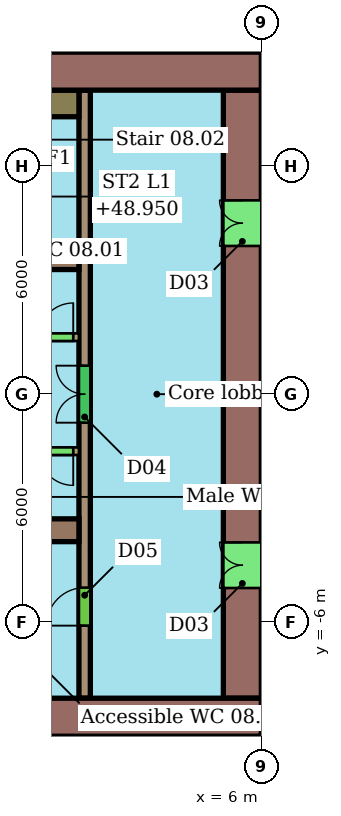
"""IFC4 building model, lengths in metres.
Left out: names, types, materials, properties, quantities, classifications, styles, units other than length and angle.
Written with IfcOpenShell. Run it as: python <this file> out.ifc"""

import sys

from ifc_helpers import new_model, si_unit, direction, frame, frame_2d, origin, place, context, subcontext, project, spatial, rectangle, extrude, element, fill, save


model = new_model("IFC4")
c1 = context("Model", 3, precision=1e-05, world=origin(), true_north=direction((0.0, 1.0)))
c2 = subcontext(c1, "Body", "Model", "MODEL_VIEW")
j1 = project(units=[si_unit("LENGTHUNIT", "METRE"), si_unit("PLANEANGLEUNIT", "RADIAN")], contexts=[c1])
p1 = place(None, origin())
s1 = spatial("IfcSite", under=j1, at=p1, CompositionType="ELEMENT")
p2 = place(p1, origin())
s2 = spatial("IfcBuilding", under=s1, at=p2, CompositionType="ELEMENT")
p3 = place(p2, frame((0.0, 0.0, 47.1)))
s3 = spatial("IfcBuildingStorey", under=s2, at=p3, CompositionType="ELEMENT", Elevation=47.1)
p4 = place(p3, frame((6.0, 8.5, 0.0), z_axis=(0.0, 0.0, 1.0), x_axis=(-1.0, 0.0, 0.0)))
e1 = element("IfcWall", 1, at=p4, inside=s3, PredefinedType="SHEAR", context=c2, shape_type="SweptSolid", body=[
    extrude(rectangle(XDim=12.0, YDim=1.0, at=frame_2d((6.0, 0.0))), origin(), (0.0, 0.0, 1.0), 3.4),
])
p5 = place(p4, frame((5.6, 0.0, 0.0)))
e2 = element("IfcOpeningElement", 2, at=p5, cuts=e1, PredefinedType="OPENING", context=c2, shape_type="SweptSolid", body=[
    extrude(rectangle(XDim=1.2, YDim=2.1, at=frame_2d((0.6, 1.05))), frame((0.0, 0.51, 0.0), z_axis=(0.0, -1.0, 0.0), x_axis=(1.0, 0.0, 0.0)), (0.0, 0.0, 1.0), 1.02),
])
p6 = place(p3, frame((-18.0, -8.5, 0.0), z_axis=(0.0, 0.0, 1.0), x_axis=(1.0, 0.0, 0.0)))
e3 = element("IfcWall", 3, at=p6, inside=s3, PredefinedType="SHEAR", context=c2, shape_type="SweptSolid", body=[
    extrude(rectangle(XDim=24.0, YDim=1.0, at=frame_2d((12.0, 0.0))), origin(), (0.0, 0.0, 1.0), 3.4),
])
p7 = place(p6, frame((6.0, 0.0, 0.0)))
e4 = element("IfcOpeningElement", 4, at=p7, cuts=e3, PredefinedType="OPENING", context=c2, shape_type="SweptSolid", body=[
    extrude(rectangle(XDim=1.2, YDim=2.1, at=frame_2d((0.6, 1.05))), frame((0.0, 0.51, 0.0), z_axis=(0.0, -1.0, 0.0), x_axis=(1.0, 0.0, 0.0)), (0.0, 0.0, 1.0), 1.02),
])
p8 = place(p3, frame((5.5, -8.0, 0.0), z_axis=(0.0, 0.0, 1.0), x_axis=(0.0, 1.0, 0.0)))
e5 = element("IfcWall", 5, at=p8, inside=s3, PredefinedType="SHEAR", context=c2, shape_type="SweptSolid", body=[
    extrude(rectangle(XDim=16.0, YDim=1.0, at=frame_2d((8.0, 0.0))), origin(), (0.0, 0.0, 1.0), 3.4),
])
p9 = place(p8, frame((2.9, 0.0, 0.0)))
e6 = element("IfcOpeningElement", 6, at=p9, cuts=e5, PredefinedType="OPENING", context=c2, shape_type="SweptSolid", body=[
    extrude(rectangle(XDim=1.2, YDim=2.1, at=frame_2d((0.6, 1.05))), frame((0.0, 0.51, 0.0), z_axis=(0.0, -1.0, 0.0), x_axis=(1.0, 0.0, 0.0)), (0.0, 0.0, 1.0), 1.02),
])
p10 = place(p8, frame((11.9, 0.0, 0.0)))
e7 = element("IfcOpeningElement", 7, at=p10, cuts=e5, PredefinedType="OPENING", context=c2, shape_type="SweptSolid", body=[
    extrude(rectangle(XDim=1.2, YDim=2.1, at=frame_2d((0.6, 1.05))), frame((0.0, 0.51, 0.0), z_axis=(0.0, -1.0, 0.0), x_axis=(1.0, 0.0, 0.0)), (0.0, 0.0, 1.0), 1.02),
])
for number, where, z_axis, x_axis in (
    (8, (-6.0, 3.58, 0.0), (0.0, 0.0, 1.0), (1.0, 0.0, 0.0)),
    (9, (-6.0, -3.58, 0.0), (0.0, 0.0, 1.0), (1.0, 0.0, 0.0)),
):
    element("IfcWall", number, at=place(p3, frame(where, z_axis=z_axis, x_axis=x_axis)), inside=s3, PredefinedType="SHEAR", context=c2, shape_type="SweptSolid", body=[
        extrude(rectangle(XDim=7.2, YDim=0.6, at=frame_2d((3.6, 0.0))), origin(), (0.0, 0.0, 1.0), 3.4),
    ])
p11 = place(p3, frame((1.35, -8.0, 0.0), z_axis=(0.0, 0.0, 1.0), x_axis=(0.0, 1.0, 0.0)))
e10 = element("IfcWall", 10, at=p11, inside=s3, PredefinedType="SHEAR", context=c2, shape_type="SweptSolid", body=[
    extrude(rectangle(XDim=16.0, YDim=0.3, at=frame_2d((8.0, 0.0))), origin(), (0.0, 0.0, 1.0), 3.4),
])
p12 = place(p11, frame((1.91, 0.0, 0.0)))
e11 = element("IfcOpeningElement", 11, at=p12, cuts=e10, PredefinedType="OPENING", context=c2, shape_type="SweptSolid", body=[
    extrude(rectangle(XDim=1.0, YDim=2.1, at=frame_2d((0.5, 1.05))), frame((0.0, 0.16, 0.0), z_axis=(0.0, -1.0, 0.0), x_axis=(1.0, 0.0, 0.0)), (0.0, 0.0, 1.0), 0.32),
])
p13 = place(p11, frame((7.25, 0.0, 0.0)))
e12 = element("IfcOpeningElement", 12, at=p13, cuts=e10, PredefinedType="OPENING", context=c2, shape_type="SweptSolid", body=[
    extrude(rectangle(XDim=1.5, YDim=2.1, at=frame_2d((0.75, 1.05))), frame((0.0, 0.16, 0.0), z_axis=(0.0, -1.0, 0.0), x_axis=(1.0, 0.0, 0.0)), (0.0, 0.0, 1.0), 0.32),
])
p14 = place(p3, frame((-13.2, 1.5, 0.0), z_axis=(0.0, 0.0, 1.0), x_axis=(1.0, 0.0, 0.0)))
e13 = element("IfcWall", 13, at=p14, inside=s3, PredefinedType="SHEAR", context=c2, shape_type="SweptSolid", body=[
    extrude(rectangle(XDim=14.4, YDim=0.2, at=frame_2d((7.2, 0.0))), origin(), (0.0, 0.0, 1.0), 3.4),
])
p15 = place(p14, frame((0.546, 0.0, 0.0)))
e14 = element("IfcOpeningElement", 14, at=p15, cuts=e13, PredefinedType="OPENING", context=c2, shape_type="SweptSolid", body=[
    extrude(rectangle(XDim=1.1, YDim=2.1, at=frame_2d((0.55, 1.05))), frame((0.0, 0.11, 0.0), z_axis=(0.0, -1.0, 0.0), x_axis=(1.0, 0.0, 0.0)), (0.0, 0.0, 1.0), 0.22),
])
p16 = place(p14, frame((2.988, 0.0, 0.0)))
e15 = element("IfcOpeningElement", 15, at=p16, cuts=e13, PredefinedType="OPENING", context=c2, shape_type="SweptSolid", body=[
    extrude(rectangle(XDim=1.1, YDim=2.1, at=frame_2d((0.55, 1.05))), frame((0.0, 0.11, 0.0), z_axis=(0.0, -1.0, 0.0), x_axis=(1.0, 0.0, 0.0)), (0.0, 0.0, 1.0), 0.22),
])
p17 = place(p14, frame((5.429, 0.0, 0.0)))
e16 = element("IfcOpeningElement", 16, at=p17, cuts=e13, PredefinedType="OPENING", context=c2, shape_type="SweptSolid", body=[
    extrude(rectangle(XDim=1.1, YDim=2.1, at=frame_2d((0.55, 1.05))), frame((0.0, 0.11, 0.0), z_axis=(0.0, -1.0, 0.0), x_axis=(1.0, 0.0, 0.0)), (0.0, 0.0, 1.0), 0.22),
])
p18 = place(p14, frame((7.871, 0.0, 0.0)))
e17 = element("IfcOpeningElement", 17, at=p18, cuts=e13, PredefinedType="OPENING", context=c2, shape_type="SweptSolid", body=[
    extrude(rectangle(XDim=1.1, YDim=2.1, at=frame_2d((0.55, 1.05))), frame((0.0, 0.11, 0.0), z_axis=(0.0, -1.0, 0.0), x_axis=(1.0, 0.0, 0.0)), (0.0, 0.0, 1.0), 0.22),
])
p19 = place(p14, frame((13.35, 0.0, 0.0)))
e18 = element("IfcOpeningElement", 18, at=p19, cuts=e13, PredefinedType="OPENING", context=c2, shape_type="SweptSolid", body=[
    extrude(rectangle(XDim=0.9, YDim=2.1, at=frame_2d((0.45, 1.05))), frame((0.0, 0.11, 0.0), z_axis=(0.0, -1.0, 0.0), x_axis=(1.0, 0.0, 0.0)), (0.0, 0.0, 1.0), 0.22),
])
p20 = place(p3, frame((1.2, -1.5, 0.0), z_axis=(0.0, 0.0, 1.0), x_axis=(-1.0, 0.0, 0.0)))
e19 = element("IfcWall", 19, at=p20, inside=s3, PredefinedType="SHEAR", context=c2, shape_type="SweptSolid", body=[
    extrude(rectangle(XDim=14.4, YDim=0.2, at=frame_2d((7.2, 0.0))), origin(), (0.0, 0.0, 1.0), 3.4),
])
p21 = place(p20, frame((7.821, 0.0, 0.0)))
e20 = element("IfcOpeningElement", 20, at=p21, cuts=e19, PredefinedType="OPENING", context=c2, shape_type="SweptSolid", body=[
    extrude(rectangle(XDim=1.2, YDim=2.1, at=frame_2d((0.6, 1.05))), frame((0.0, 0.11, 0.0), z_axis=(0.0, -1.0, 0.0), x_axis=(1.0, 0.0, 0.0)), (0.0, 0.0, 1.0), 0.22),
])
p22 = place(p20, frame((0.15, 0.0, 0.0)))
e21 = element("IfcOpeningElement", 21, at=p22, cuts=e19, PredefinedType="OPENING", context=c2, shape_type="SweptSolid", body=[
    extrude(rectangle(XDim=0.9, YDim=2.1, at=frame_2d((0.45, 1.05))), frame((0.0, 0.11, 0.0), z_axis=(0.0, -1.0, 0.0), x_axis=(1.0, 0.0, 0.0)), (0.0, 0.0, 1.0), 0.22),
])
p23 = place(p3, frame((0.4, 7.65, 0.0), z_axis=(0.0, 0.0, 1.0), x_axis=(1.0, 0.0, 0.0)))
e22 = element("IfcWall", 22, at=p23, inside=s3, PredefinedType="SHEAR", context=c2, shape_type="SweptSolid", body=[
    extrude(rectangle(XDim=0.8, YDim=0.7, at=frame_2d((0.4, 0.0))), origin(), (0.0, 0.0, 1.0), 3.4),
])
p24 = place(p9, origin())
e23 = element("IfcDoor", 23, at=p24, inside=s3, OperationType="DOUBLE_DOOR_SINGLE_SWING", PredefinedType="NOTDEFINED", context=c2, shape_type="SweptSolid", body=[
    extrude(rectangle(XDim=1.2, YDim=2.1, at=frame_2d((0.6, 1.05))), frame((0.0, 0.025, 0.0), z_axis=(0.0, -1.0, 0.0), x_axis=(1.0, 0.0, 0.0)), (0.0, 0.0, 1.0), 0.05),
])
fill(e6, e23)
p25 = place(p10, origin())
e24 = element("IfcDoor", 24, at=p25, inside=s3, OperationType="DOUBLE_DOOR_SINGLE_SWING", PredefinedType="NOTDEFINED", context=c2, shape_type="SweptSolid", body=[
    extrude(rectangle(XDim=1.2, YDim=2.1, at=frame_2d((0.6, 1.05))), frame((0.0, 0.025, 0.0), z_axis=(0.0, -1.0, 0.0), x_axis=(1.0, 0.0, 0.0)), (0.0, 0.0, 1.0), 0.05),
])
fill(e7, e24)
p26 = place(p12, origin())
e25 = element("IfcDoor", 25, at=p26, inside=s3, OperationType="SINGLE_SWING_LEFT", PredefinedType="NOTDEFINED", context=c2, shape_type="SweptSolid", body=[
    extrude(rectangle(XDim=1.0, YDim=2.1, at=frame_2d((0.5, 1.05))), frame((0.0, 0.025, 0.0), z_axis=(0.0, -1.0, 0.0), x_axis=(1.0, 0.0, 0.0)), (0.0, 0.0, 1.0), 0.05),
])
fill(e11, e25)
p27 = place(p13, origin())
e26 = element("IfcDoor", 26, at=p27, inside=s3, OperationType="DOUBLE_DOOR_SINGLE_SWING", PredefinedType="NOTDEFINED", context=c2, shape_type="SweptSolid", body=[
    extrude(rectangle(XDim=1.5, YDim=2.1, at=frame_2d((0.75, 1.05))), frame((0.0, 0.025, 0.0), z_axis=(0.0, -1.0, 0.0), x_axis=(1.0, 0.0, 0.0)), (0.0, 0.0, 1.0), 0.05),
])
fill(e12, e26)
p28 = place(p19, origin())
e27 = element("IfcDoor", 27, at=p28, inside=s3, OperationType="SINGLE_SWING_RIGHT", PredefinedType="NOTDEFINED", context=c2, shape_type="SweptSolid", body=[
    extrude(rectangle(XDim=0.9, YDim=2.1, at=frame_2d((0.45, 1.05))), frame((0.0, 0.025, 0.0), z_axis=(0.0, -1.0, 0.0), x_axis=(1.0, 0.0, 0.0)), (0.0, 0.0, 1.0), 0.05),
])
fill(e18, e27)
p29 = place(p22, origin())
e28 = element("IfcDoor", 28, at=p29, inside=s3, OperationType="SINGLE_SWING_LEFT", PredefinedType="NOTDEFINED", context=c2, shape_type="SweptSolid", body=[
    extrude(rectangle(XDim=0.9, YDim=2.1, at=frame_2d((0.45, 1.05))), frame((0.0, 0.025, 0.0), z_axis=(0.0, -1.0, 0.0), x_axis=(1.0, 0.0, 0.0)), (0.0, 0.0, 1.0), 0.05),
])
fill(e21, e28)
save(model, sys.argv[1])
